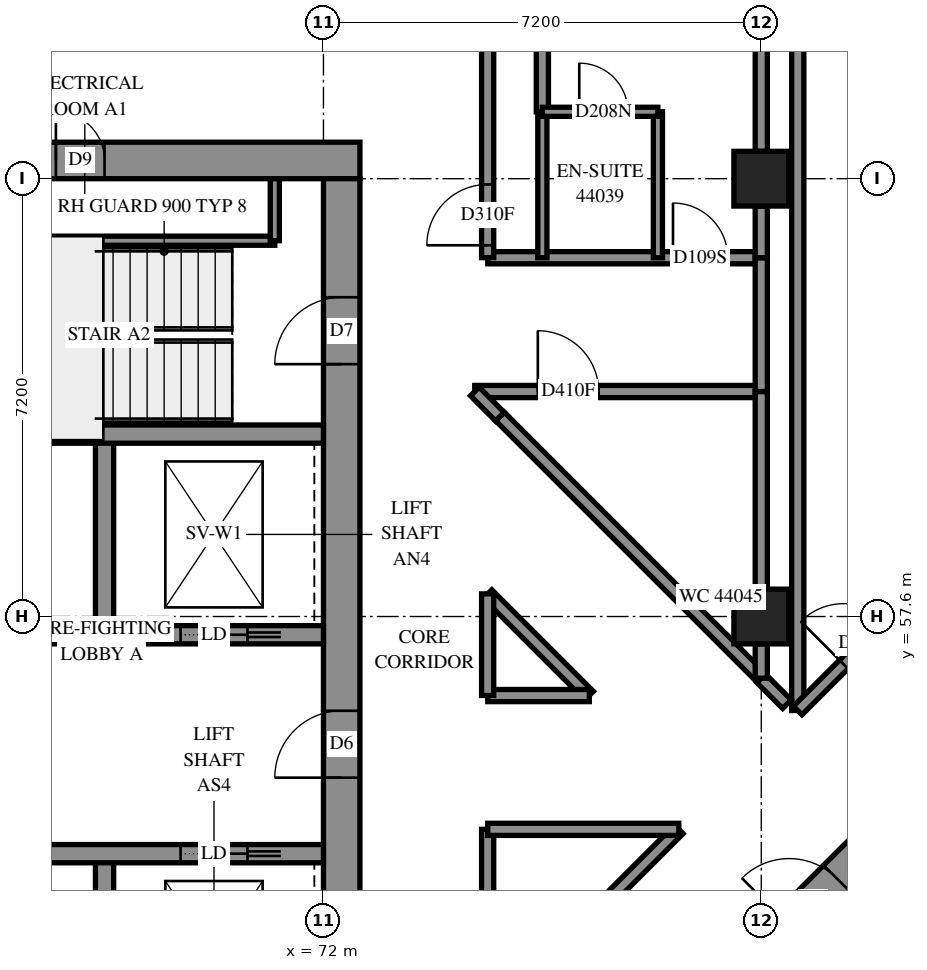
"""IFC4 building model, lengths in metres.
Left out: names, types, materials, properties, quantities, classifications, styles, units other than length and angle.
Written with IfcOpenShell. Run it as: python <this file> out.ifc"""

import sys

from ifc_helpers import new_model, si_unit, direction, frame, frame_2d, origin, origin_2d, place, context, subcontext, project, spatial, rectangle, extrude, element, fill, save


model = new_model("IFC4")
c1 = context("Model", 3, precision=1e-05, world=origin(), true_north=direction((0.0, 1.0)))
c2 = subcontext(c1, "Body", "Model", "MODEL_VIEW")
j1 = project(units=[si_unit("LENGTHUNIT", "METRE"), si_unit("PLANEANGLEUNIT", "RADIAN")], contexts=[c1])
p1 = place(None, origin())
s1 = spatial("IfcSite", under=j1, at=p1, CompositionType="ELEMENT")
p2 = place(p1, origin())
s2 = spatial("IfcBuilding", under=s1, at=p2, CompositionType="ELEMENT")
p3 = place(p2, frame((0.0, 0.0, 162.6)))
s3 = spatial("IfcBuildingStorey", under=s2, at=p3, CompositionType="ELEMENT", Elevation=162.6)
for number, where, z_axis, x_axis in (
    (1, (79.2, 57.6, 0.0), (0.0, 0.0, 1.0), (1.0, 0.0, 0.0)),
    (2, (79.2, 64.8, 0.0), (0.0, 0.0, 1.0), (1.0, 0.0, 0.0)),
):
    element("IfcColumn", number, at=place(p3, frame(where, z_axis=z_axis, x_axis=x_axis)), inside=s3, PredefinedType="COLUMN", context=c2, shape_type="SweptSolid", body=[
        extrude(rectangle(XDim=0.9, YDim=0.9, at=origin_2d()), origin(), (0.0, 0.0, 1.0), 3.1),
    ])
p4 = place(p3, frame((57.0, 65.1, -0.3), z_axis=(0.0, 0.0, 1.0), x_axis=(1.0, 0.0, 0.0)))
e3 = element("IfcWall", 3, at=p4, inside=s3, PredefinedType="SHEAR", context=c2, shape_type="SweptSolid", body=[
    extrude(rectangle(XDim=15.6, YDim=0.6, at=frame_2d((7.8, 0.0))), origin(), (0.0, 0.0, 1.0), 2.7),
])
p5 = place(p4, frame((10.6, 0.0, 0.3)))
e4 = element("IfcOpeningElement", 4, at=p5, cuts=e3, PredefinedType="OPENING", context=c2, shape_type="SweptSolid", body=[
    extrude(rectangle(XDim=0.8, YDim=2.1, at=frame_2d((0.4, 1.05))), frame((0.0, 0.31, 0.0), z_axis=(0.0, -1.0, 0.0), x_axis=(1.0, 0.0, 0.0)), (0.0, 0.0, 1.0), 0.62),
])
p6 = place(p3, frame((72.3, 50.4, -0.3), z_axis=(0.0, 0.0, 1.0), x_axis=(0.0, 1.0, 0.0)))
e5 = element("IfcWall", 5, at=p6, inside=s3, PredefinedType="SHEAR", context=c2, shape_type="SweptSolid", body=[
    extrude(rectangle(XDim=14.4, YDim=0.6, at=frame_2d((7.2, 0.0))), origin(), (0.0, 0.0, 1.0), 2.7),
])
p7 = place(p6, frame((4.55, 0.0, 0.3)))
e6 = element("IfcOpeningElement", 6, at=p7, cuts=e5, PredefinedType="OPENING", context=c2, shape_type="SweptSolid", body=[
    extrude(rectangle(XDim=1.1, YDim=2.1, at=frame_2d((0.55, 1.05))), frame((0.0, 0.31, 0.0), z_axis=(0.0, -1.0, 0.0), x_axis=(1.0, 0.0, 0.0)), (0.0, 0.0, 1.0), 0.62),
])
p8 = place(p6, frame((11.35, 0.0, 0.3)))
e7 = element("IfcOpeningElement", 7, at=p8, cuts=e5, PredefinedType="OPENING", context=c2, shape_type="SweptSolid", body=[
    extrude(rectangle(XDim=1.1, YDim=2.1, at=frame_2d((0.55, 1.05))), frame((0.0, 0.31, 0.0), z_axis=(0.0, -1.0, 0.0), x_axis=(1.0, 0.0, 0.0)), (0.0, 0.0, 1.0), 0.62),
])
for number, where, z_axis, x_axis in (
    (8, (68.4, 50.4, 0.0), (0.0, 0.0, 1.0), (0.0, 1.0, 0.0)),
    (9, (68.4, 57.3, 0.0), (0.0, 0.0, 1.0), (0.0, 1.0, 0.0)),
):
    element("IfcWall", number, at=place(p3, frame(where, z_axis=z_axis, x_axis=x_axis)), inside=s3, PredefinedType="SOLIDWALL", context=c2, shape_type="SweptSolid", body=[
        extrude(rectangle(XDim=3.3, YDim=0.3, at=frame_2d((1.65, 0.0))), origin(), (0.0, 0.0, 1.0), 3.1),
    ])
p9 = place(p3, frame((57.6, 53.7, 0.0), z_axis=(0.0, 0.0, 1.0), x_axis=(1.0, 0.0, 0.0)))
e10 = element("IfcWall", 10, at=p9, inside=s3, PredefinedType="SOLIDWALL", context=c2, shape_type="SweptSolid", body=[
    extrude(rectangle(XDim=14.4, YDim=0.3, at=frame_2d((7.2, 0.0))), origin(), (0.0, 0.0, 1.0), 3.1),
])
p10 = place(p9, frame((1.35, 0.0, 0.0)))
e11 = element("IfcOpeningElement", 11, at=p10, cuts=e10, PredefinedType="OPENING", context=c2, shape_type="SweptSolid", body=[
    extrude(rectangle(XDim=0.9, YDim=2.1, at=frame_2d((0.45, 1.05))), frame((0.0, 0.16, 0.0), z_axis=(0.0, -1.0, 0.0), x_axis=(1.0, 0.0, 0.0)), (0.0, 0.0, 1.0), 0.32),
])
p11 = place(p9, frame((4.95, 0.0, 0.0)))
e12 = element("IfcOpeningElement", 12, at=p11, cuts=e10, PredefinedType="OPENING", context=c2, shape_type="SweptSolid", body=[
    extrude(rectangle(XDim=0.9, YDim=2.1, at=frame_2d((0.45, 1.05))), frame((0.0, 0.16, 0.0), z_axis=(0.0, -1.0, 0.0), x_axis=(1.0, 0.0, 0.0)), (0.0, 0.0, 1.0), 0.32),
])
p12 = place(p9, frame((8.55, 0.0, 0.0)))
e13 = element("IfcOpeningElement", 13, at=p12, cuts=e10, PredefinedType="OPENING", context=c2, shape_type="SweptSolid", body=[
    extrude(rectangle(XDim=0.9, YDim=2.1, at=frame_2d((0.45, 1.05))), frame((0.0, 0.16, 0.0), z_axis=(0.0, -1.0, 0.0), x_axis=(1.0, 0.0, 0.0)), (0.0, 0.0, 1.0), 0.32),
])
p13 = place(p9, frame((12.05, 0.0, 0.0)))
e14 = element("IfcOpeningElement", 14, at=p13, cuts=e10, PredefinedType="OPENING", context=c2, shape_type="SweptSolid", body=[
    extrude(rectangle(XDim=1.1, YDim=2.1, at=frame_2d((0.55, 1.05))), frame((0.0, 0.16, 0.0), z_axis=(0.0, -1.0, 0.0), x_axis=(1.0, 0.0, 0.0)), (0.0, 0.0, 1.0), 0.32),
])
p14 = place(p3, frame((57.6, 57.3, 0.0), z_axis=(0.0, 0.0, 1.0), x_axis=(1.0, 0.0, 0.0)))
e15 = element("IfcWall", 15, at=p14, inside=s3, PredefinedType="SOLIDWALL", context=c2, shape_type="SweptSolid", body=[
    extrude(rectangle(XDim=14.4, YDim=0.3, at=frame_2d((7.2, 0.0))), origin(), (0.0, 0.0, 1.0), 3.1),
])
p15 = place(p14, frame((1.25, 0.0, 0.0)))
e16 = element("IfcOpeningElement", 16, at=p15, cuts=e15, PredefinedType="OPENING", context=c2, shape_type="SweptSolid", body=[
    extrude(rectangle(XDim=1.1, YDim=2.1, at=frame_2d((0.55, 1.05))), frame((0.0, 0.16, 0.0), z_axis=(0.0, -1.0, 0.0), x_axis=(1.0, 0.0, 0.0)), (0.0, 0.0, 1.0), 0.32),
])
p16 = place(p14, frame((4.85, 0.0, 0.0)))
e17 = element("IfcOpeningElement", 17, at=p16, cuts=e15, PredefinedType="OPENING", context=c2, shape_type="SweptSolid", body=[
    extrude(rectangle(XDim=1.1, YDim=2.1, at=frame_2d((0.55, 1.05))), frame((0.0, 0.16, 0.0), z_axis=(0.0, -1.0, 0.0), x_axis=(1.0, 0.0, 0.0)), (0.0, 0.0, 1.0), 0.32),
])
p17 = place(p14, frame((8.45, 0.0, 0.0)))
e18 = element("IfcOpeningElement", 18, at=p17, cuts=e15, PredefinedType="OPENING", context=c2, shape_type="SweptSolid", body=[
    extrude(rectangle(XDim=1.1, YDim=2.1, at=frame_2d((0.55, 1.05))), frame((0.0, 0.16, 0.0), z_axis=(0.0, -1.0, 0.0), x_axis=(1.0, 0.0, 0.0)), (0.0, 0.0, 1.0), 0.32),
])
p18 = place(p14, frame((12.05, 0.0, 0.0)))
e19 = element("IfcOpeningElement", 19, at=p18, cuts=e15, PredefinedType="OPENING", context=c2, shape_type="SweptSolid", body=[
    extrude(rectangle(XDim=1.1, YDim=2.1, at=frame_2d((0.55, 1.05))), frame((0.0, 0.16, 0.0), z_axis=(0.0, -1.0, 0.0), x_axis=(1.0, 0.0, 0.0)), (0.0, 0.0, 1.0), 0.32),
])
p19 = place(p3, frame((64.8, 60.6, 0.0), z_axis=(0.0, 0.0, 1.0), x_axis=(1.0, 0.0, 0.0)))
e20 = element("IfcWall", 20, at=p19, inside=s3, PredefinedType="SOLIDWALL", context=c2, shape_type="SweptSolid", body=[
    extrude(rectangle(XDim=7.2, YDim=0.3, at=frame_2d((3.6, 0.0))), origin(), (0.0, 0.0, 1.0), 3.1),
])
p20 = place(p3, frame((76.442, 49.302, -0.3), z_axis=(0.0, 0.0, 1.0), x_axis=(0.7071067812, 0.7071067812, 0.0)))
e21 = element("IfcWall", 21, at=p20, inside=s3, PredefinedType="SHEAR", context=c2, shape_type="SweptSolid", body=[
    extrude(rectangle(XDim=14.4, YDim=0.6, at=frame_2d((7.2, 0.0))), origin(), (0.0, 0.0, 1.0), 2.7),
])
p21 = place(p20, frame((4.55, 0.0, 0.3)))
e22 = element("IfcOpeningElement", 22, at=p21, cuts=e21, PredefinedType="OPENING", context=c2, shape_type="SweptSolid", body=[
    extrude(rectangle(XDim=1.1, YDim=2.1, at=frame_2d((0.55, 1.05))), frame((0.0, 0.31, 0.0), z_axis=(0.0, -1.0, 0.0), x_axis=(1.0, 0.0, 0.0)), (0.0, 0.0, 1.0), 0.62),
])
p22 = place(p20, frame((11.35, 0.0, 0.3)))
e23 = element("IfcOpeningElement", 23, at=p22, cuts=e21, PredefinedType="OPENING", context=c2, shape_type="SweptSolid", body=[
    extrude(rectangle(XDim=1.1, YDim=2.1, at=frame_2d((0.55, 1.05))), frame((0.0, 0.31, 0.0), z_axis=(0.0, -1.0, 0.0), x_axis=(1.0, 0.0, 0.0)), (0.0, 0.0, 1.0), 0.62),
])
p23 = place(p3, frame((64.95, 63.78, 0.0), z_axis=(0.0, 0.0, 1.0), x_axis=(1.0, 0.0, 0.0)))
e24 = element("IfcWall", 24, at=p23, inside=s3, PredefinedType="PARTITIONING", context=c2, shape_type="SweptSolid", body=[
    extrude(rectangle(XDim=6.25, YDim=0.15, at=frame_2d((3.125, 0.0))), origin(), (0.0, 0.0, 1.0), 3.1),
])
p24 = place(p3, frame((71.2, 63.78, 0.0), z_axis=(0.0, 0.0, 1.0), x_axis=(0.0, 1.0, 0.0)))
e25 = element("IfcWall", 25, at=p24, inside=s3, PredefinedType="PARTITIONING", context=c2, shape_type="SweptSolid", body=[
    extrude(rectangle(XDim=1.02, YDim=0.15, at=frame_2d((0.51, 0.0))), origin(), (0.0, 0.0, 1.0), 3.1),
])
p25 = place(p3, frame((79.8, 56.054, 0.0), z_axis=(0.0, 0.0, 1.0), x_axis=(0.0, 1.0, 0.0)))
e26 = element("IfcWall", 26, at=p25, inside=s3, PredefinedType="PARTITIONING", context=c2, shape_type="SweptSolid", body=[
    extrude(rectangle(XDim=11.454, YDim=0.2, at=frame_2d((5.727, 0.0))), origin(), (0.0, 0.0, 1.0), 3.1),
])
p26 = place(p3, frame((79.799, 56.055, 0.0), z_axis=(0.0, 0.0, 1.0), x_axis=(0.7071067812, 0.7071067812, 0.0)))
e27 = element("IfcWall", 27, at=p26, inside=s3, PredefinedType="PARTITIONING", context=c2, shape_type="SweptSolid", body=[
    extrude(rectangle(XDim=9.95, YDim=0.2, at=frame_2d((4.975, 0.0))), origin(), (0.0, 0.0, 1.0), 3.1),
])
p27 = place(p26, frame((1.071, 0.0, 0.0)))
e28 = element("IfcOpeningElement", 28, at=p27, cuts=e27, PredefinedType="OPENING", context=c2, shape_type="SweptSolid", body=[
    extrude(rectangle(XDim=1.0, YDim=2.1, at=frame_2d((0.5, 1.05))), frame((0.0, 0.11, 0.0), z_axis=(0.0, -1.0, 0.0), x_axis=(1.0, 0.0, 0.0)), (0.0, 0.0, 1.0), 0.22),
])
p28 = place(p3, frame((75.6, 65.9, 0.0), z_axis=(0.0, 0.0, 1.0), x_axis=(0.0, 1.0, 0.0)))
e29 = element("IfcWall", 29, at=p28, inside=s3, PredefinedType="PARTITIONING", context=c2, shape_type="SweptSolid", body=[
    extrude(rectangle(XDim=6.904, YDim=0.2, at=frame_2d((3.452, 0.0))), origin(), (0.0, 0.0, 1.0), 3.1),
])
p29 = place(p3, frame((79.2, 65.25, 0.0), z_axis=(0.0, 0.0, 1.0), x_axis=(0.0, 1.0, 0.0)))
e30 = element("IfcWall", 30, at=p29, inside=s3, PredefinedType="PARTITIONING", context=c2, shape_type="SweptSolid", body=[
    extrude(rectangle(XDim=6.3, YDim=0.2, at=frame_2d((3.15, 0.0))), origin(), (0.0, 0.0, 1.0), 3.1),
])
p30 = place(p3, frame((74.903, 60.889, 0.0), z_axis=(0.0, 0.0, 1.0), x_axis=(0.7071067812, -0.7071067812, 0.0)))
e31 = element("IfcWall", 31, at=p30, inside=s3, PredefinedType="PARTITIONING", context=c2, shape_type="SweptSolid", body=[
    extrude(rectangle(XDim=6.081, YDim=0.2, at=frame_2d((3.041, 0.0))), origin(), (0.0, 0.0, 1.0), 3.1),
])
p31 = place(p3, frame((74.488, 61.3, 0.0), z_axis=(0.0, 0.0, 1.0), x_axis=(1.0, 0.0, 0.0)))
e32 = element("IfcWall", 32, at=p31, inside=s3, PredefinedType="PARTITIONING", context=c2, shape_type="SweptSolid", body=[
    extrude(rectangle(XDim=4.712, YDim=0.2, at=frame_2d((2.356, 0.0))), origin(), (0.0, 0.0, 1.0), 3.1),
])
p32 = place(p31, frame((1.037, 0.0, 0.0)))
e33 = element("IfcOpeningElement", 33, at=p32, cuts=e32, PredefinedType="OPENING", context=c2, shape_type="SweptSolid", body=[
    extrude(rectangle(XDim=1.0, YDim=2.1, at=frame_2d((0.5, 1.05))), frame((0.0, 0.11, 0.0), z_axis=(0.0, -1.0, 0.0), x_axis=(1.0, 0.0, 0.0)), (0.0, 0.0, 1.0), 0.22),
])
p33 = place(p3, frame((74.702, 63.5, 0.0), z_axis=(0.0, 0.0, 1.0), x_axis=(1.0, 0.0, 0.0)))
e34 = element("IfcWall", 34, at=p33, inside=s3, PredefinedType="PARTITIONING", context=c2, shape_type="SweptSolid", body=[
    extrude(rectangle(XDim=4.498, YDim=0.2, at=frame_2d((2.249, 0.0))), origin(), (0.0, 0.0, 1.0), 3.1),
])
p34 = place(p33, frame((3.046, 0.0, 0.0)))
e35 = element("IfcOpeningElement", 35, at=p34, cuts=e34, PredefinedType="OPENING", context=c2, shape_type="SweptSolid", body=[
    extrude(rectangle(XDim=0.9, YDim=2.1, at=frame_2d((0.45, 1.05))), frame((0.0, 0.11, 0.0), z_axis=(0.0, -1.0, 0.0), x_axis=(1.0, 0.0, 0.0)), (0.0, 0.0, 1.0), 0.22),
])
p35 = place(p3, frame((74.701, 50.957, 0.0), z_axis=(0.0, 0.0, 1.0), x_axis=(0.7071067812, 0.7071067812, 0.0)))
e36 = element("IfcWall", 36, at=p35, inside=s3, PredefinedType="PARTITIONING", context=c2, shape_type="SweptSolid", body=[
    extrude(rectangle(XDim=4.444, YDim=0.2, at=frame_2d((2.222, 0.0))), origin(), (0.0, 0.0, 1.0), 3.1),
])
p36 = place(p3, frame((74.7, 63.502, 0.0), z_axis=(0.0, 0.0, 1.0), x_axis=(0.0, 1.0, 0.0)))
e37 = element("IfcWall", 37, at=p36, inside=s3, PredefinedType="PARTITIONING", context=c2, shape_type="SweptSolid", body=[
    extrude(rectangle(XDim=3.998, YDim=0.2, at=frame_2d((1.999, 0.0))), origin(), (0.0, 0.0, 1.0), 3.1),
])
p37 = place(p36, frame((0.203, 0.0, 0.0)))
e38 = element("IfcOpeningElement", 38, at=p37, cuts=e37, PredefinedType="OPENING", context=c2, shape_type="SweptSolid", body=[
    extrude(rectangle(XDim=1.0, YDim=2.1, at=frame_2d((0.5, 1.05))), frame((0.0, 0.11, 0.0), z_axis=(0.0, -1.0, 0.0), x_axis=(1.0, 0.0, 0.0)), (0.0, 0.0, 1.0), 0.22),
])
p38 = place(p3, frame((79.2, 58.05, 0.0), z_axis=(0.0, 0.0, 1.0), x_axis=(0.0, 1.0, 0.0)))
e39 = element("IfcWall", 39, at=p38, inside=s3, PredefinedType="PARTITIONING", context=c2, shape_type="SweptSolid", body=[
    extrude(rectangle(XDim=3.25, YDim=0.2, at=frame_2d((1.625, 0.0))), origin(), (0.0, 0.0, 1.0), 3.1),
])
p39 = place(p3, frame((74.7, 50.956, 0.0), z_axis=(0.0, 0.0, 1.0), x_axis=(0.0, 1.0, 0.0)))
e40 = element("IfcWall", 40, at=p39, inside=s3, PredefinedType="PARTITIONING", context=c2, shape_type="SweptSolid", body=[
    extrude(rectangle(XDim=3.144, YDim=0.2, at=frame_2d((1.572, 0.0))), origin(), (0.0, 0.0, 1.0), 3.1),
])
p40 = place(p3, frame((74.702, 54.1, 0.0), z_axis=(0.0, 0.0, 1.0), x_axis=(1.0, 0.0, 0.0)))
e41 = element("IfcWall", 41, at=p40, inside=s3, PredefinedType="PARTITIONING", context=c2, shape_type="SweptSolid", body=[
    extrude(rectangle(XDim=3.142, YDim=0.2, at=frame_2d((1.571, 0.0))), origin(), (0.0, 0.0, 1.0), 3.1),
])
for number, where, z_axis, x_axis in (
    (42, (75.6, 63.5, 0.0), (0.0, 0.0, 1.0), (0.0, 1.0, 0.0)),
    (43, (77.5, 63.5, 0.0), (0.0, 0.0, 1.0), (0.0, 1.0, 0.0)),
):
    element("IfcWall", number, at=place(p3, frame(where, z_axis=z_axis, x_axis=x_axis)), inside=s3, PredefinedType="PARTITIONING", context=c2, shape_type="SweptSolid", body=[
        extrude(rectangle(XDim=2.4, YDim=0.15, at=frame_2d((1.2, 0.0))), origin(), (0.0, 0.0, 1.0), 3.1),
    ])
p41 = place(p3, frame((74.699, 57.969, 0.0), z_axis=(0.0, 0.0, 1.0), x_axis=(0.7071067812, -0.7071067812, 0.0)))
e44 = element("IfcWall", 44, at=p41, inside=s3, PredefinedType="PARTITIONING", context=c2, shape_type="SweptSolid", body=[
    extrude(rectangle(XDim=2.362, YDim=0.2, at=frame_2d((1.181, 0.0))), origin(), (0.0, 0.0, 1.0), 3.1),
])
p42 = place(p3, frame((79.2, 61.3, 0.0), z_axis=(0.0, 0.0, 1.0), x_axis=(0.0, 1.0, 0.0)))
e45 = element("IfcWall", 45, at=p42, inside=s3, PredefinedType="PARTITIONING", context=c2, shape_type="SweptSolid", body=[
    extrude(rectangle(XDim=2.2, YDim=0.2, at=frame_2d((1.1, 0.0))), origin(), (0.0, 0.0, 1.0), 3.1),
])
p43 = place(p3, frame((75.6, 65.9, 0.0), z_axis=(0.0, 0.0, 1.0), x_axis=(1.0, 0.0, 0.0)))
e46 = element("IfcWall", 46, at=p43, inside=s3, PredefinedType="PARTITIONING", context=c2, shape_type="SweptSolid", body=[
    extrude(rectangle(XDim=1.9, YDim=0.15, at=frame_2d((0.95, 0.0))), origin(), (0.0, 0.0, 1.0), 3.1),
])
p44 = place(p43, frame((0.607, 0.0, 0.0)))
e47 = element("IfcOpeningElement", 47, at=p44, cuts=e46, PredefinedType="OPENING", context=c2, shape_type="SweptSolid", body=[
    extrude(rectangle(XDim=0.8, YDim=2.1, at=frame_2d((0.4, 1.05))), frame((0.0, 0.085, 0.0), z_axis=(0.0, -1.0, 0.0), x_axis=(1.0, 0.0, 0.0)), (0.0, 0.0, 1.0), 0.17),
])
for number, where, z_axis, x_axis in (
    (48, (74.702, 56.3, 0.0), (0.0, 0.0, 1.0), (1.0, 0.0, 0.0)),
    (49, (74.7, 56.302, 0.0), (0.0, 0.0, 1.0), (0.0, 1.0, 0.0)),
):
    element("IfcWall", number, at=place(p3, frame(where, z_axis=z_axis, x_axis=x_axis)), inside=s3, PredefinedType="PARTITIONING", context=c2, shape_type="SweptSolid", body=[
        extrude(rectangle(XDim=1.67, YDim=0.2, at=frame_2d((0.835, 0.0))), origin(), (0.0, 0.0, 1.0), 3.1),
    ])
p45 = place(p3, frame((79.2, 63.5, 0.0), z_axis=(0.0, 0.0, 1.0), x_axis=(0.0, 1.0, 0.0)))
e50 = element("IfcWall", 50, at=p45, inside=s3, PredefinedType="PARTITIONING", context=c2, shape_type="SweptSolid", body=[
    extrude(rectangle(XDim=0.85, YDim=0.2, at=frame_2d((0.425, 0.0))), origin(), (0.0, 0.0, 1.0), 3.1),
])
p46 = place(p3, frame((79.198, 56.584, 0.0), z_axis=(0.0, 0.0, 1.0), x_axis=(0.7054410477, -0.7087685999, 0.0)))
e51 = element("IfcWall", 51, at=p46, inside=s3, PredefinedType="PARTITIONING", context=c2, shape_type="SweptSolid", body=[
    extrude(rectangle(XDim=0.601, YDim=0.2, at=frame_2d((0.3, 0.0))), origin(), (0.0, 0.0, 1.0), 3.1),
])
p47 = place(p3, frame((74.489, 61.301, 0.0), z_axis=(0.0, 0.0, 1.0), x_axis=(0.7053925905, -0.7088168263, 0.0)))
e52 = element("IfcWall", 52, at=p47, inside=s3, PredefinedType="PARTITIONING", context=c2, shape_type="SweptSolid", body=[
    extrude(rectangle(XDim=0.584, YDim=0.2, at=frame_2d((0.292, 0.0))), origin(), (0.0, 0.0, 1.0), 3.1),
])
p48 = place(p3, frame((79.2, 56.586, 0.0), z_axis=(0.0, 0.0, 1.0), x_axis=(0.0, 1.0, 0.0)))
e53 = element("IfcWall", 53, at=p48, inside=s3, PredefinedType="PARTITIONING", context=c2, shape_type="SweptSolid", body=[
    extrude(rectangle(XDim=0.564, YDim=0.2, at=frame_2d((0.282, 0.0))), origin(), (0.0, 0.0, 1.0), 3.1),
])
p49 = place(p5, origin())
e54 = element("IfcDoor", 54, at=p49, inside=s3, OperationType="SINGLE_SWING_RIGHT", PredefinedType="DOOR", context=c2, shape_type="SweptSolid", body=[
    extrude(rectangle(XDim=0.8, YDim=2.1, at=frame_2d((0.4, 1.05))), frame((0.0, 0.025, 0.0), z_axis=(0.0, -1.0, 0.0), x_axis=(1.0, 0.0, 0.0)), (0.0, 0.0, 1.0), 0.05),
])
fill(e4, e54)
p50 = place(p7, origin())
e55 = element("IfcDoor", 55, at=p50, inside=s3, OperationType="DOUBLE_DOOR_SINGLE_SWING", PredefinedType="DOOR", context=c2, shape_type="SweptSolid", body=[
    extrude(rectangle(XDim=1.1, YDim=2.1, at=frame_2d((0.55, 1.05))), frame((0.0, 0.025, 0.0), z_axis=(0.0, -1.0, 0.0), x_axis=(1.0, 0.0, 0.0)), (0.0, 0.0, 1.0), 0.05),
])
fill(e6, e55)
p51 = place(p8, origin())
e56 = element("IfcDoor", 56, at=p51, inside=s3, OperationType="SINGLE_SWING_RIGHT", PredefinedType="DOOR", context=c2, shape_type="SweptSolid", body=[
    extrude(rectangle(XDim=1.1, YDim=2.1, at=frame_2d((0.55, 1.05))), frame((0.0, 0.025, 0.0), z_axis=(0.0, -1.0, 0.0), x_axis=(1.0, 0.0, 0.0)), (0.0, 0.0, 1.0), 0.05),
])
fill(e7, e56)
p52 = place(p13, origin())
e57 = element("IfcDoor", 57, at=p52, inside=s3, OperationType="SLIDING_TO_RIGHT", PredefinedType="DOOR", context=c2, shape_type="SweptSolid", body=[
    extrude(rectangle(XDim=1.1, YDim=2.1, at=frame_2d((0.55, 1.05))), frame((0.0, 0.025, 0.0), z_axis=(0.0, -1.0, 0.0), x_axis=(1.0, 0.0, 0.0)), (0.0, 0.0, 1.0), 0.05),
])
fill(e14, e57)
p53 = place(p18, origin())
e58 = element("IfcDoor", 58, at=p53, inside=s3, OperationType="SLIDING_TO_RIGHT", PredefinedType="DOOR", context=c2, shape_type="SweptSolid", body=[
    extrude(rectangle(XDim=1.1, YDim=2.1, at=frame_2d((0.55, 1.05))), frame((0.0, 0.025, 0.0), z_axis=(0.0, -1.0, 0.0), x_axis=(1.0, 0.0, 0.0)), (0.0, 0.0, 1.0), 0.05),
])
fill(e19, e58)
p54 = place(p21, origin())
e59 = element("IfcDoor", 59, at=p54, inside=s3, OperationType="DOUBLE_DOOR_SINGLE_SWING", PredefinedType="DOOR", context=c2, shape_type="SweptSolid", body=[
    extrude(rectangle(XDim=1.1, YDim=2.1, at=frame_2d((0.55, 1.05))), frame((0.0, 0.025, 0.0), z_axis=(0.0, -1.0, 0.0), x_axis=(1.0, 0.0, 0.0)), (0.0, 0.0, 1.0), 0.05),
])
fill(e22, e59)
p55 = place(p37, origin())
e60 = element("IfcDoor", 60, at=p55, inside=s3, OperationType="SINGLE_SWING_RIGHT", PredefinedType="DOOR", context=c2, shape_type="SweptSolid", body=[
    extrude(rectangle(XDim=1.0, YDim=2.1, at=frame_2d((0.5, 1.05))), frame((0.0, 0.025, 0.0), z_axis=(0.0, -1.0, 0.0), x_axis=(1.0, 0.0, 0.0)), (0.0, 0.0, 1.0), 0.05),
])
fill(e38, e60)
p56 = place(p34, origin())
e61 = element("IfcDoor", 61, at=p56, inside=s3, OperationType="SINGLE_SWING_LEFT", PredefinedType="DOOR", context=c2, shape_type="SweptSolid", body=[
    extrude(rectangle(XDim=0.9, YDim=2.1, at=frame_2d((0.45, 1.05))), frame((0.0, 0.025, 0.0), z_axis=(0.0, -1.0, 0.0), x_axis=(1.0, 0.0, 0.0)), (0.0, 0.0, 1.0), 0.05),
])
fill(e35, e61)
p57 = place(p44, origin())
e62 = element("IfcDoor", 62, at=p57, inside=s3, OperationType="SINGLE_SWING_RIGHT", PredefinedType="DOOR", context=c2, shape_type="SweptSolid", body=[
    extrude(rectangle(XDim=0.8, YDim=2.1, at=frame_2d((0.4, 1.05))), frame((0.0, 0.025, 0.0), z_axis=(0.0, -1.0, 0.0), x_axis=(1.0, 0.0, 0.0)), (0.0, 0.0, 1.0), 0.05),
])
fill(e47, e62)
p58 = place(p32, origin())
e63 = element("IfcDoor", 63, at=p58, inside=s3, OperationType="SINGLE_SWING_RIGHT", PredefinedType="DOOR", context=c2, shape_type="SweptSolid", body=[
    extrude(rectangle(XDim=1.0, YDim=2.1, at=frame_2d((0.5, 1.05))), frame((0.0, 0.025, 0.0), z_axis=(0.0, -1.0, 0.0), x_axis=(1.0, 0.0, 0.0)), (0.0, 0.0, 1.0), 0.05),
])
fill(e33, e63)
p59 = place(p27, origin())
e64 = element("IfcDoor", 64, at=p59, inside=s3, OperationType="SINGLE_SWING_RIGHT", PredefinedType="DOOR", context=c2, shape_type="SweptSolid", body=[
    extrude(rectangle(XDim=1.0, YDim=2.1, at=frame_2d((0.5, 1.05))), frame((0.0, 0.025, 0.0), z_axis=(0.0, -1.0, 0.0), x_axis=(1.0, 0.0, 0.0)), (0.0, 0.0, 1.0), 0.05),
])
fill(e28, e64)
save(model, sys.argv[1])
